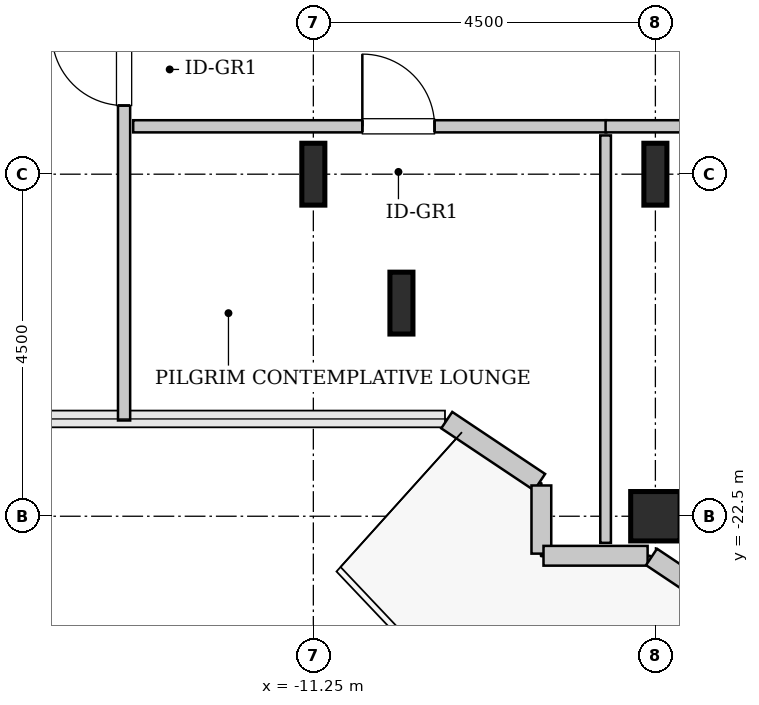
"""IFC4 building model, lengths in metres.
Left out: names, types, materials, properties, quantities, classifications, styles, units other than length and angle.
Written with IfcOpenShell. Run it as: python <this file> out.ifc"""

import sys

from ifc_helpers import new_model, si_unit, direction, frame, frame_2d, origin, origin_2d, place, context, subcontext, project, spatial, rectangle, hollow_rectangle, i_section, extrude, source, transform, mapped, element, fill, save


model = new_model("IFC4")
c1 = context("Model", 3, precision=1e-05, world=origin(), true_north=direction((0.0, 1.0)))
c2 = subcontext(c1, "Body", "Model", "MODEL_VIEW")
j1 = project(units=[si_unit("LENGTHUNIT", "METRE"), si_unit("PLANEANGLEUNIT", "RADIAN")], contexts=[c1])
p1 = place(None, origin())
s1 = spatial("IfcSite", under=j1, at=p1, CompositionType="ELEMENT")
p2 = place(p1, origin())
s2 = spatial("IfcBuilding", under=s1, at=p2, CompositionType="ELEMENT")
p3 = place(p2, frame((0.0, 0.0, 248.4)))
s3 = spatial("IfcBuildingStorey", under=s2, at=p3, CompositionType="ELEMENT", Elevation=248.4)
m1 = source(origin(), c2, "Body", "SweptSolid", [
    extrude(i_section(OverallWidth=0.303, OverallDepth=0.814, WebThickness=0.021, FlangeThickness=0.04, FilletRadius=0.03, at=origin_2d()), origin(), (0.0, 0.0, 1.0), 3.8),
])
for number, where, z_axis, x_axis in (
    (1, (-11.25, -18.0, 0.0), (0.0, 0.0, 1.0), (1.0, 0.0, 0.0)),
    (2, (-10.091, -19.696, 0.0), (0.0, 0.0, 1.0), (1.0, 0.0, 0.0)),
):
    element("IfcColumn", number, at=place(p3, frame(where, z_axis=z_axis, x_axis=x_axis)), inside=s3, PredefinedType="COLUMN", context=c2, shape_type="MappedRepresentation", body=[
        mapped(m1, transform((0.0, 0.0, 0.0), x_axis=(1.0, 0.0, 0.0), y_axis=(0.0, 1.0, 0.0), z_axis=(0.0, 0.0, 1.0), scale=1.0)),
    ])
m2 = source(origin(), c2, "Body", "SweptSolid", [
    extrude(hollow_rectangle(XDim=0.65, YDim=0.65, WallThickness=0.032, InnerFilletRadius=0.032, OuterFilletRadius=0.064, at=origin_2d()), origin(), (0.0, 0.0, 1.0), 3.8),
])
p4 = place(p3, frame((-6.75, -22.5, 0.0), z_axis=(0.0, 0.0, 1.0), x_axis=(1.0, 0.0, 0.0)))
e3 = element("IfcColumn", 3, at=p4, inside=s3, PredefinedType="COLUMN", context=c2, shape_type="MappedRepresentation", body=[
    mapped(m2, transform((0.0, 0.0, 0.0), x_axis=(1.0, 0.0, 0.0), y_axis=(0.0, 1.0, 0.0), z_axis=(0.0, 0.0, 1.0), scale=1.0)),
])
p5 = place(p3, frame((-6.75, -18.0, 0.0), z_axis=(0.0, 0.0, 1.0), x_axis=(1.0, 0.0, 0.0)))
e4 = element("IfcColumn", 4, at=p5, inside=s3, PredefinedType="COLUMN", context=c2, shape_type="MappedRepresentation", body=[
    mapped(m1, transform((0.0, 0.0, 0.0), x_axis=(1.0, 0.0, 0.0), y_axis=(0.0, 1.0, 0.0), z_axis=(0.0, 0.0, 1.0), scale=1.0)),
])
m3 = source(origin(), c2, "Body", "SweptSolid", [
    extrude(rectangle(XDim=1.469, YDim=0.26, at=frame_2d((0.734, 0.0))), origin(), (0.0, 0.0, 1.0), 3.55),
])
p6 = place(p3, frame((-9.495, -21.236, 0.0), z_axis=(0.0, 0.0, 1.0), x_axis=(0.831461760506, -0.555581983884, 0.0)))
e5 = element("IfcWall", 5, at=p6, inside=s3, PredefinedType="SOLIDWALL", context=c2, shape_type="MappedRepresentation", body=[
    mapped(m3, transform((0.0, 0.0, 0.0), x_axis=(1.0, 0.0, 0.0), y_axis=(0.0, 1.0, 0.0), z_axis=(0.0, 0.0, 1.0), scale=1.0)),
])
m4 = source(origin(), c2, "Body", "SweptSolid", [
    extrude(rectangle(XDim=0.897, YDim=0.26, at=frame_2d((0.448, 0.0))), origin(), (0.0, 0.0, 1.0), 3.55),
])
p7 = place(p3, frame((-8.25, -22.095, 0.0), z_axis=(0.0, 0.0, 1.0), x_axis=(0.0, -1.0, 0.0)))
e6 = element("IfcWall", 6, at=p7, inside=s3, PredefinedType="SOLIDWALL", context=c2, shape_type="MappedRepresentation", body=[
    mapped(m4, transform((0.0, 0.0, 0.0), x_axis=(1.0, 0.0, 0.0), y_axis=(0.0, 1.0, 0.0), z_axis=(0.0, 0.0, 1.0), scale=1.0)),
])
m5 = source(origin(), c2, "Body", "SweptSolid", [
    extrude(rectangle(XDim=1.37, YDim=0.26, at=frame_2d((0.685, 0.0))), origin(), (0.0, 0.0, 1.0), 3.55),
])
p8 = place(p3, frame((-8.222, -23.02, 0.0), z_axis=(0.0, 0.0, 1.0), x_axis=(1.0, 0.0, 0.0)))
e7 = element("IfcWall", 7, at=p8, inside=s3, PredefinedType="SOLIDWALL", context=c2, shape_type="MappedRepresentation", body=[
    mapped(m5, transform((0.0, 0.0, 0.0), x_axis=(1.0, 0.0, 0.0), y_axis=(0.0, 1.0, 0.0), z_axis=(0.0, 0.0, 1.0), scale=1.0)),
])
m6 = source(origin(), c2, "Body", "SweptSolid", [
    extrude(rectangle(XDim=0.565, YDim=0.26, at=frame_2d((0.283, 0.0))), origin(), (0.0, 0.0, 1.0), 3.55),
])
p9 = place(p3, frame((-6.801, -23.036, 0.0), z_axis=(0.0, 0.0, 1.0), x_axis=(0.831651492666, -0.555297933317, 0.0)))
e8 = element("IfcWall", 8, at=p9, inside=s3, PredefinedType="SOLIDWALL", context=c2, shape_type="MappedRepresentation", body=[
    mapped(m6, transform((0.0, 0.0, 0.0), x_axis=(1.0, 0.0, 0.0), y_axis=(0.0, 1.0, 0.0), z_axis=(0.0, 0.0, 1.0), scale=1.0)),
])
m7 = source(origin(), c2, "Body", "SweptSolid", [
    extrude(rectangle(XDim=5.406, YDim=0.16, at=frame_2d((2.703, 0.0))), origin(), (0.0, 0.0, 1.0), 3.535),
])
p10 = place(p3, frame((-13.74, -21.24, 0.0), z_axis=(0.0, 0.0, 1.0), x_axis=(0.0, 1.0, 0.0)))
e9 = element("IfcWall", 9, at=p10, inside=s3, PredefinedType="PARTITIONING", context=c2, shape_type="MappedRepresentation", body=[
    mapped(m7, transform((0.0, 0.0, 0.0), x_axis=(1.0, 0.0, 0.0), y_axis=(0.0, 1.0, 0.0), z_axis=(0.0, 0.0, 1.0), scale=1.0)),
])
p11 = place(p10, frame((4.143, 0.0, 0.0)))
e10 = element("IfcOpeningElement", 10, at=p11, cuts=e9, PredefinedType="OPENING", context=c2, shape_type="SweptSolid", body=[
    extrude(rectangle(XDim=0.95, YDim=2.1, at=frame_2d((0.475, 1.05))), frame((0.0, 0.09, 0.0), z_axis=(0.0, -1.0, 0.0), x_axis=(1.0, 0.0, 0.0)), (0.0, 0.0, 1.0), 0.18),
])
m8 = source(origin(), c2, "Body", "SweptSolid", [
    extrude(rectangle(XDim=6.225, YDim=0.16, at=frame_2d((3.113, 0.0))), origin(), (0.0, 0.0, 1.0), 3.535),
])
p12 = place(p3, frame((-13.62, -17.37, 0.0), z_axis=(0.0, 0.0, 1.0), x_axis=(1.0, 0.0, 0.0)))
e11 = element("IfcWall", 11, at=p12, inside=s3, PredefinedType="PARTITIONING", context=c2, shape_type="MappedRepresentation", body=[
    mapped(m8, transform((0.0, 0.0, 0.0), x_axis=(1.0, 0.0, 0.0), y_axis=(0.0, 1.0, 0.0), z_axis=(0.0, 0.0, 1.0), scale=1.0)),
])
p13 = place(p12, frame((3.015, 0.0, 0.0)))
e12 = element("IfcOpeningElement", 12, at=p13, cuts=e11, PredefinedType="OPENING", context=c2, shape_type="SweptSolid", body=[
    extrude(rectangle(XDim=0.95, YDim=2.1, at=frame_2d((0.475, 1.05))), frame((0.0, 0.09, 0.0), z_axis=(0.0, -1.0, 0.0), x_axis=(1.0, 0.0, 0.0)), (0.0, 0.0, 1.0), 0.18),
])
m9 = source(origin(), c2, "Body", "SweptSolid", [
    extrude(rectangle(XDim=5.36, YDim=0.14, at=frame_2d((2.68, 0.0))), origin(), (0.0, 0.0, 1.0), 3.535),
])
p14 = place(p3, frame((-7.405, -22.85, 0.0), z_axis=(0.0, 0.0, 1.0), x_axis=(0.0, 1.0, 0.0)))
e13 = element("IfcWall", 13, at=p14, inside=s3, PredefinedType="PARTITIONING", context=c2, shape_type="MappedRepresentation", body=[
    mapped(m9, transform((0.0, 0.0, 0.0), x_axis=(1.0, 0.0, 0.0), y_axis=(0.0, 1.0, 0.0), z_axis=(0.0, 0.0, 1.0), scale=1.0)),
])
m10 = source(origin(), c2, "Body", "SweptSolid", [
    extrude(rectangle(XDim=12.21, YDim=0.16, at=frame_2d((6.105, 0.0))), origin(), (0.0, 0.0, 1.0), 3.535),
])
p15 = place(p3, frame((-7.405, -17.37, 0.0), z_axis=(0.0, 0.0, 1.0), x_axis=(1.0, 0.0, 0.0)))
e14 = element("IfcWall", 14, at=p15, inside=s3, PredefinedType="PARTITIONING", context=c2, shape_type="MappedRepresentation", body=[
    mapped(m10, transform((0.0, 0.0, 0.0), x_axis=(1.0, 0.0, 0.0), y_axis=(0.0, 1.0, 0.0), z_axis=(0.0, 0.0, 1.0), scale=1.0)),
])
p16 = place(p15, frame((5.63, 0.0, 0.0)))
e15 = element("IfcOpeningElement", 15, at=p16, cuts=e14, PredefinedType="OPENING", context=c2, shape_type="SweptSolid", body=[
    extrude(rectangle(XDim=0.95, YDim=2.1, at=frame_2d((0.475, 1.05))), frame((0.0, 0.09, 0.0), z_axis=(0.0, -1.0, 0.0), x_axis=(1.0, 0.0, 0.0)), (0.0, 0.0, 1.0), 0.18),
])
m11 = source(origin(), c2, "Body", "SweptSolid", [
    extrude(rectangle(XDim=0.95, YDim=2.1, at=frame_2d((0.475, 1.05))), frame((0.0, 0.025, 0.0), z_axis=(0.0, -1.0, 0.0), x_axis=(1.0, 0.0, 0.0)), (0.0, 0.0, 1.0), 0.05),
])
p17 = place(p11, origin())
e16 = element("IfcDoor", 16, at=p17, inside=s3, OperationType="SINGLE_SWING_RIGHT", PredefinedType="DOOR", context=c2, shape_type="MappedRepresentation", body=[
    mapped(m11, transform((0.0, 0.0, 0.0), x_axis=(1.0, 0.0, 0.0), y_axis=(0.0, 1.0, 0.0), z_axis=(0.0, 0.0, 1.0), scale=1.0)),
])
fill(e10, e16)
p18 = place(p13, origin())
e17 = element("IfcDoor", 17, at=p18, inside=s3, OperationType="SINGLE_SWING_LEFT", PredefinedType="DOOR", context=c2, shape_type="MappedRepresentation", body=[
    mapped(m11, transform((0.0, 0.0, 0.0), x_axis=(1.0, 0.0, 0.0), y_axis=(0.0, 1.0, 0.0), z_axis=(0.0, 0.0, 1.0), scale=1.0)),
])
fill(e12, e17)
save(model, sys.argv[1])
